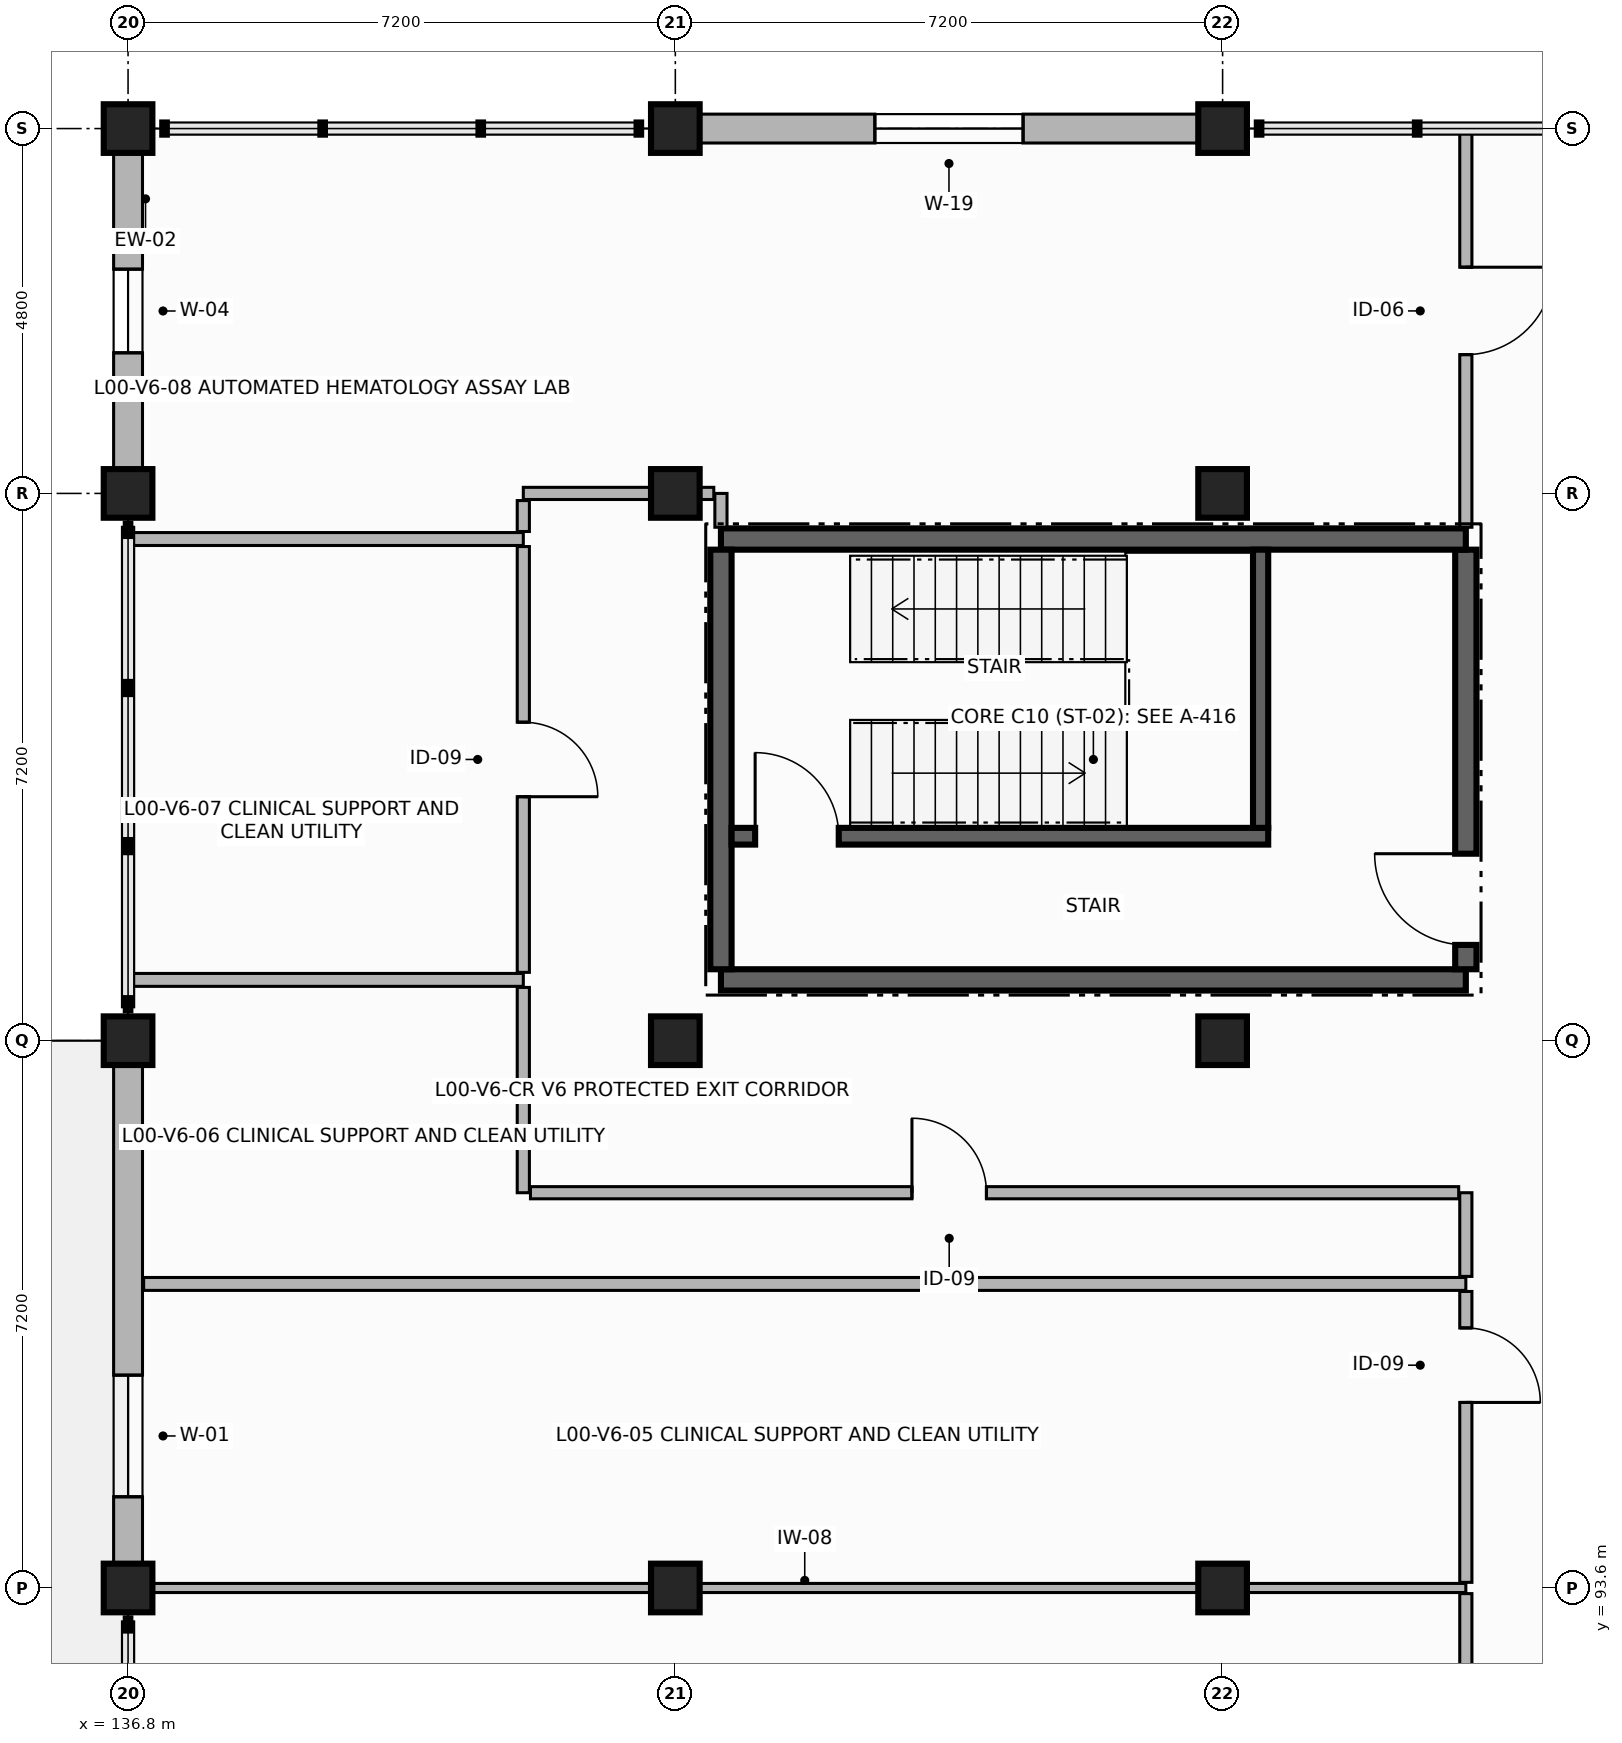
"""IFC4 building model, lengths in metres.
Left out: names, types, materials, properties, quantities, classifications, styles, units other than length and angle.
Written with IfcOpenShell. Run it as: python <this file> out.ifc"""

import sys

from ifc_helpers import new_model, si_unit, direction, frame, frame_2d, origin, origin_2d, place, context, subcontext, project, spatial, rectangle, extrude, element, fill, save


model = new_model("IFC4")
c1 = context("Model", 3, precision=1e-05, world=origin(), true_north=direction((0.0, 1.0)))
c2 = subcontext(c1, "Body", "Model", "MODEL_VIEW")
j1 = project(units=[si_unit("LENGTHUNIT", "METRE"), si_unit("PLANEANGLEUNIT", "RADIAN")], contexts=[c1])
p1 = place(None, origin())
s1 = spatial("IfcSite", under=j1, at=p1, CompositionType="ELEMENT")
p2 = place(p1, origin())
s2 = spatial("IfcBuilding", under=s1, at=p2, CompositionType="ELEMENT")
p3 = place(p2, origin())
s3 = spatial("IfcBuildingStorey", under=s2, at=p3, CompositionType="ELEMENT", Elevation=0.0)
for number, where, z_axis, x_axis in (
    (1, (136.8, 93.6, -0.38), (0.0, 0.0, 1.0), (1.0, 0.0, 0.0)),
    (2, (136.8, 100.8, -0.38), (0.0, 0.0, 1.0), (1.0, 0.0, 0.0)),
    (3, (136.8, 108.0, -0.38), (0.0, 0.0, 1.0), (1.0, 0.0, 0.0)),
    (4, (136.8, 112.8, -0.38), (0.0, 0.0, 1.0), (1.0, 0.0, 0.0)),
    (5, (144.0, 93.6, -0.38), (0.0, 0.0, 1.0), (1.0, 0.0, 0.0)),
    (6, (144.0, 100.8, -0.38), (0.0, 0.0, 1.0), (1.0, 0.0, 0.0)),
    (7, (144.0, 108.0, -0.38), (0.0, 0.0, 1.0), (1.0, 0.0, 0.0)),
    (8, (144.0, 112.8, -0.38), (0.0, 0.0, 1.0), (1.0, 0.0, 0.0)),
    (9, (151.2, 93.6, -0.38), (0.0, 0.0, 1.0), (1.0, 0.0, 0.0)),
    (10, (151.2, 100.8, -0.38), (0.0, 0.0, 1.0), (1.0, 0.0, 0.0)),
    (11, (151.2, 108.0, -0.38), (0.0, 0.0, 1.0), (1.0, 0.0, 0.0)),
    (12, (151.2, 112.8, -0.38), (0.0, 0.0, 1.0), (1.0, 0.0, 0.0)),
):
    element("IfcColumn", number, at=place(p3, frame(where, z_axis=z_axis, x_axis=x_axis)), inside=s3, PredefinedType="COLUMN", context=c2, shape_type="SweptSolid", body=[
        extrude(rectangle(XDim=0.64, YDim=0.64, at=origin_2d()), origin(), (0.0, 0.0, 1.0), 4.56),
    ])
p4 = place(p3, frame((151.2, 112.8, 0.0), z_axis=(0.0, 0.0, 1.0), x_axis=(-1.0, 0.0, 0.0)))
e13 = element("IfcWall", 13, at=p4, inside=s3, PredefinedType="SOLIDWALL", context=c2, shape_type="SweptSolid", body=[
    extrude(rectangle(XDim=7.2, YDim=0.38, at=frame_2d((3.6, 0.0))), origin(), (0.0, 0.0, 1.0), 3.51),
])
p5 = place(p4, frame((2.625, 0.0, 0.85)))
e14 = element("IfcOpeningElement", 14, at=p5, cuts=e13, PredefinedType="OPENING", context=c2, shape_type="SweptSolid", body=[
    extrude(rectangle(XDim=1.95, YDim=2.4, at=frame_2d((0.975, 1.2))), frame((0.0, 0.2, 0.0), z_axis=(0.0, -1.0, 0.0), x_axis=(1.0, 0.0, 0.0)), (0.0, 0.0, 1.0), 0.4),
])
p6 = place(p3, frame((136.8, 112.8, 0.0), z_axis=(0.0, 0.0, 1.0), x_axis=(0.0, -1.0, 0.0)))
e15 = element("IfcWall", 15, at=p6, inside=s3, PredefinedType="SOLIDWALL", context=c2, shape_type="SweptSolid", body=[
    extrude(rectangle(XDim=4.8, YDim=0.38, at=frame_2d((2.4, 0.0))), origin(), (0.0, 0.0, 1.0), 3.51),
])
p7 = place(p6, frame((1.85, 0.0, 0.85)))
e16 = element("IfcOpeningElement", 16, at=p7, cuts=e15, PredefinedType="OPENING", context=c2, shape_type="SweptSolid", body=[
    extrude(rectangle(XDim=1.1, YDim=2.35, at=frame_2d((0.55, 1.175))), frame((0.0, 0.2, 0.0), z_axis=(0.0, -1.0, 0.0), x_axis=(1.0, 0.0, 0.0)), (0.0, 0.0, 1.0), 0.4),
])
p8 = place(p3, frame((136.8, 100.8, 0.0), z_axis=(0.0, 0.0, 1.0), x_axis=(0.0, -1.0, 0.0)))
e17 = element("IfcWall", 17, at=p8, inside=s3, PredefinedType="SOLIDWALL", context=c2, shape_type="SweptSolid", body=[
    extrude(rectangle(XDim=7.2, YDim=0.38, at=frame_2d((3.6, 0.0))), origin(), (0.0, 0.0, 1.0), 3.51),
])
p9 = place(p8, frame((4.4, 0.0, 0.85)))
e18 = element("IfcOpeningElement", 18, at=p9, cuts=e17, PredefinedType="OPENING", context=c2, shape_type="SweptSolid", body=[
    extrude(rectangle(XDim=1.6, YDim=2.45, at=frame_2d((0.8, 1.225))), frame((0.0, 0.2, 0.0), z_axis=(0.0, -1.0, 0.0), x_axis=(1.0, 0.0, 0.0)), (0.0, 0.0, 1.0), 0.4),
])
p10 = place(p3, frame((144.6, 101.6, 0.0), z_axis=(0.0, 0.0, 1.0), x_axis=(1.0, 0.0, 0.0)))
e19 = element("IfcWall", 19, at=p10, inside=s3, PredefinedType="SHEAR", context=c2, shape_type="SweptSolid", body=[
    extrude(rectangle(XDim=9.8, YDim=0.28, at=frame_2d((4.9, 0.0))), origin(), (0.0, 0.0, 1.0), 4.18),
])
p11 = place(p3, frame((154.4, 101.74, 0.0), z_axis=(0.0, 0.0, 1.0), x_axis=(0.0, 1.0, 0.0)))
e20 = element("IfcWall", 20, at=p11, inside=s3, PredefinedType="SHEAR", context=c2, shape_type="SweptSolid", body=[
    extrude(rectangle(XDim=5.52, YDim=0.28, at=frame_2d((2.76, 0.0))), origin(), (0.0, 0.0, 1.0), 4.18),
])
p12 = place(p11, frame((0.32, 0.0, 0.0)))
e21 = element("IfcOpeningElement", 21, at=p12, cuts=e20, PredefinedType="OPENING", context=c2, shape_type="SweptSolid", body=[
    extrude(rectangle(XDim=1.2, YDim=2.25, at=frame_2d((0.6, 1.125))), frame((0.0, 0.15, 0.0), z_axis=(0.0, -1.0, 0.0), x_axis=(1.0, 0.0, 0.0)), (0.0, 0.0, 1.0), 0.3),
])
p13 = place(p3, frame((154.4, 107.4, 0.0), z_axis=(0.0, 0.0, 1.0), x_axis=(-1.0, 0.0, 0.0)))
e22 = element("IfcWall", 22, at=p13, inside=s3, PredefinedType="SHEAR", context=c2, shape_type="SweptSolid", body=[
    extrude(rectangle(XDim=9.8, YDim=0.28, at=frame_2d((4.9, 0.0))), origin(), (0.0, 0.0, 1.0), 4.18),
])
p14 = place(p3, frame((144.6, 107.26, 0.0), z_axis=(0.0, 0.0, 1.0), x_axis=(0.0, -1.0, 0.0)))
e23 = element("IfcWall", 23, at=p14, inside=s3, PredefinedType="SHEAR", context=c2, shape_type="SweptSolid", body=[
    extrude(rectangle(XDim=5.52, YDim=0.28, at=frame_2d((2.76, 0.0))), origin(), (0.0, 0.0, 1.0), 4.18),
])
p15 = place(p3, frame((144.74, 103.49, 0.0), z_axis=(0.0, 0.0, 1.0), x_axis=(1.0, 0.0, 0.0)))
e24 = element("IfcWall", 24, at=p15, inside=s3, PredefinedType="SHEAR", context=c2, shape_type="SweptSolid", body=[
    extrude(rectangle(XDim=7.06, YDim=0.22, at=frame_2d((3.53, 0.0))), origin(), (0.0, 0.0, 1.0), 4.18),
])
p16 = place(p15, frame((0.31, 0.0, 0.0)))
e25 = element("IfcOpeningElement", 25, at=p16, cuts=e24, PredefinedType="OPENING", context=c2, shape_type="SweptSolid", body=[
    extrude(rectangle(XDim=1.1, YDim=2.15, at=frame_2d((0.55, 1.075))), frame((0.0, 0.12, 0.0), z_axis=(0.0, -1.0, 0.0), x_axis=(1.0, 0.0, 0.0)), (0.0, 0.0, 1.0), 0.24),
])
p17 = place(p3, frame((151.7, 103.6, 0.0), z_axis=(0.0, 0.0, 1.0), x_axis=(0.0, 1.0, 0.0)))
e26 = element("IfcWall", 26, at=p17, inside=s3, PredefinedType="SHEAR", context=c2, shape_type="SweptSolid", body=[
    extrude(rectangle(XDim=3.66, YDim=0.2, at=frame_2d((1.83, 0.0))), origin(), (0.0, 0.0, 1.0), 4.18),
])
p18 = place(p3, frame((137.005, 93.6, 0.0), z_axis=(0.0, 0.0, 1.0), x_axis=(1.0, 0.0, 0.0)))
e27 = element("IfcWall", 27, at=p18, inside=s3, PredefinedType="PARTITIONING", context=c2, shape_type="SweptSolid", body=[
    extrude(rectangle(XDim=17.395, YDim=0.12, at=frame_2d((8.698, 0.0))), origin(), (0.0, 0.0, 1.0), 3.49),
])
p19 = place(p3, frame((154.4, 93.526, 0.0), z_axis=(0.0, 0.0, 1.0), x_axis=(0.0, -1.0, 0.0)))
e28 = element("IfcWall", 28, at=p19, inside=s3, PredefinedType="PARTITIONING", context=c2, shape_type="SweptSolid", body=[
    extrude(rectangle(XDim=7.126, YDim=0.16, at=frame_2d((3.563, 0.0))), origin(), (0.0, 0.0, 1.0), 3.49),
])
p20 = place(p19, frame((2.773, 0.0, 0.0)))
e29 = element("IfcOpeningElement", 29, at=p20, cuts=e28, PredefinedType="OPENING", context=c2, shape_type="SweptSolid", body=[
    extrude(rectangle(XDim=1.35, YDim=2.25, at=frame_2d((0.675, 1.125))), frame((0.0, 0.09, 0.0), z_axis=(0.0, -1.0, 0.0), x_axis=(1.0, 0.0, 0.0)), (0.0, 0.0, 1.0), 0.18),
])
p21 = place(p3, frame((137.005, 97.6, 0.0), z_axis=(0.0, 0.0, 1.0), x_axis=(1.0, 0.0, 0.0)))
e30 = element("IfcWall", 30, at=p21, inside=s3, PredefinedType="PARTITIONING", context=c2, shape_type="SweptSolid", body=[
    extrude(rectangle(XDim=17.395, YDim=0.17, at=frame_2d((8.698, 0.0))), origin(), (0.0, 0.0, 1.0), 3.49),
])
p22 = place(p3, frame((154.4, 97.501, 0.0), z_axis=(0.0, 0.0, 1.0), x_axis=(0.0, -1.0, 0.0)))
e31 = element("IfcWall", 31, at=p22, inside=s3, PredefinedType="PARTITIONING", context=c2, shape_type="SweptSolid", body=[
    extrude(rectangle(XDim=3.827, YDim=0.16, at=frame_2d((1.914, 0.0))), origin(), (0.0, 0.0, 1.0), 3.49),
])
p23 = place(p22, frame((0.48, 0.0, 0.0)))
e32 = element("IfcOpeningElement", 32, at=p23, cuts=e31, PredefinedType="OPENING", context=c2, shape_type="SweptSolid", body=[
    extrude(rectangle(XDim=0.98, YDim=2.15, at=frame_2d((0.49, 1.075))), frame((0.0, 0.09, 0.0), z_axis=(0.0, -1.0, 0.0), x_axis=(1.0, 0.0, 0.0)), (0.0, 0.0, 1.0), 0.18),
])
p24 = place(p3, frame((154.4, 98.8, 0.0), z_axis=(0.0, 0.0, 1.0), x_axis=(0.0, -1.0, 0.0)))
e33 = element("IfcWall", 33, at=p24, inside=s3, PredefinedType="PARTITIONING", context=c2, shape_type="SweptSolid", body=[
    extrude(rectangle(XDim=1.101, YDim=0.16, at=frame_2d((0.551, 0.0))), origin(), (0.0, 0.0, 1.0), 3.49),
])
p25 = place(p3, frame((136.8, 101.6, 0.0), z_axis=(0.0, 0.0, 1.0), x_axis=(1.0, 0.0, 0.0)))
e34 = element("IfcWall", 34, at=p25, inside=s3, PredefinedType="PARTITIONING", context=c2, shape_type="SweptSolid", body=[
    extrude(rectangle(XDim=5.2, YDim=0.17, at=frame_2d((2.6, 0.0))), origin(), (0.0, 0.0, 1.0), 3.49),
])
p26 = place(p3, frame((142.0, 101.501, 0.0), z_axis=(0.0, 0.0, 1.0), x_axis=(0.0, -1.0, 0.0)))
e35 = element("IfcWall", 35, at=p26, inside=s3, PredefinedType="PARTITIONING", context=c2, shape_type="SweptSolid", body=[
    extrude(rectangle(XDim=2.701, YDim=0.16, at=frame_2d((1.351, 0.0))), origin(), (0.0, 0.0, 1.0), 3.49),
])
p27 = place(p3, frame((142.094, 98.8, 0.0), z_axis=(0.0, 0.0, 1.0), x_axis=(1.0, 0.0, 0.0)))
e36 = element("IfcWall", 36, at=p27, inside=s3, PredefinedType="PARTITIONING", context=c2, shape_type="SweptSolid", body=[
    extrude(rectangle(XDim=12.212, YDim=0.16, at=frame_2d((6.106, 0.0))), origin(), (0.0, 0.0, 1.0), 3.49),
])
p28 = place(p27, frame((5.019, 0.0, 0.0)))
e37 = element("IfcOpeningElement", 37, at=p28, cuts=e36, PredefinedType="OPENING", context=c2, shape_type="SweptSolid", body=[
    extrude(rectangle(XDim=0.98, YDim=2.15, at=frame_2d((0.49, 1.075))), frame((0.0, 0.09, 0.0), z_axis=(0.0, -1.0, 0.0), x_axis=(1.0, 0.0, 0.0)), (0.0, 0.0, 1.0), 0.18),
])
p29 = place(p3, frame((136.8, 107.4, 0.0), z_axis=(0.0, 0.0, 1.0), x_axis=(1.0, 0.0, 0.0)))
e38 = element("IfcWall", 38, at=p29, inside=s3, PredefinedType="PARTITIONING", context=c2, shape_type="SweptSolid", body=[
    extrude(rectangle(XDim=5.2, YDim=0.17, at=frame_2d((2.6, 0.0))), origin(), (0.0, 0.0, 1.0), 3.49),
])
p30 = place(p3, frame((142.0, 107.301, 0.0), z_axis=(0.0, 0.0, 1.0), x_axis=(0.0, -1.0, 0.0)))
e39 = element("IfcWall", 39, at=p30, inside=s3, PredefinedType="PARTITIONING", context=c2, shape_type="SweptSolid", body=[
    extrude(rectangle(XDim=5.602, YDim=0.16, at=frame_2d((2.801, 0.0))), origin(), (0.0, 0.0, 1.0), 3.49),
])
p31 = place(p30, frame((2.311, 0.0, 0.0)))
e40 = element("IfcOpeningElement", 40, at=p31, cuts=e39, PredefinedType="OPENING", context=c2, shape_type="SweptSolid", body=[
    extrude(rectangle(XDim=0.98, YDim=2.15, at=frame_2d((0.49, 1.075))), frame((0.0, 0.09, 0.0), z_axis=(0.0, -1.0, 0.0), x_axis=(1.0, 0.0, 0.0)), (0.0, 0.0, 1.0), 0.18),
])
p32 = place(p3, frame((144.6, 107.555, 0.0), z_axis=(0.0, 0.0, 1.0), x_axis=(0.0, 1.0, 0.0)))
e41 = element("IfcWall", 41, at=p32, inside=s3, PredefinedType="PARTITIONING", context=c2, shape_type="SweptSolid", body=[
    extrude(rectangle(XDim=0.445, YDim=0.16, at=frame_2d((0.223, 0.0))), origin(), (0.0, 0.0, 1.0), 3.49),
])
p33 = place(p3, frame((144.506, 108.0, 0.0), z_axis=(0.0, 0.0, 1.0), x_axis=(-1.0, 0.0, 0.0)))
e42 = element("IfcWall", 42, at=p33, inside=s3, PredefinedType="PARTITIONING", context=c2, shape_type="SweptSolid", body=[
    extrude(rectangle(XDim=2.506, YDim=0.16, at=frame_2d((1.253, 0.0))), origin(), (0.0, 0.0, 1.0), 3.49),
])
p34 = place(p3, frame((142.0, 107.906, 0.0), z_axis=(0.0, 0.0, 1.0), x_axis=(0.0, -1.0, 0.0)))
e43 = element("IfcWall", 43, at=p34, inside=s3, PredefinedType="PARTITIONING", context=c2, shape_type="SweptSolid", body=[
    extrude(rectangle(XDim=0.407, YDim=0.16, at=frame_2d((0.204, 0.0))), origin(), (0.0, 0.0, 1.0), 3.49),
])
p35 = place(p3, frame((154.4, 112.8, 0.0), z_axis=(0.0, 0.0, 1.0), x_axis=(0.0, -1.0, 0.0)))
e44 = element("IfcWall", 44, at=p35, inside=s3, PredefinedType="PARTITIONING", context=c2, shape_type="SweptSolid", body=[
    extrude(rectangle(XDim=5.245, YDim=0.16, at=frame_2d((2.623, 0.0))), origin(), (0.0, 0.0, 1.0), 3.49),
])
p36 = place(p35, frame((1.824, 0.0, 0.0)))
e45 = element("IfcOpeningElement", 45, at=p36, cuts=e44, PredefinedType="OPENING", context=c2, shape_type="SweptSolid", body=[
    extrude(rectangle(XDim=1.15, YDim=2.25, at=frame_2d((0.575, 1.125))), frame((0.0, 0.09, 0.0), z_axis=(0.0, -1.0, 0.0), x_axis=(1.0, 0.0, 0.0)), (0.0, 0.0, 1.0), 0.18),
])
p37 = place(p5, origin())
e46 = element("IfcWindow", 46, at=p37, inside=s3, PartitioningType="SINGLE_PANEL", PredefinedType="WINDOW", context=c2, shape_type="SweptSolid", body=[
    extrude(rectangle(XDim=1.95, YDim=2.4, at=frame_2d((0.975, 1.2))), frame((0.0, 0.03, 0.0), z_axis=(0.0, -1.0, 0.0), x_axis=(1.0, 0.0, 0.0)), (0.0, 0.0, 1.0), 0.06),
])
fill(e14, e46)
p38 = place(p7, origin())
e47 = element("IfcWindow", 47, at=p38, inside=s3, PartitioningType="SINGLE_PANEL", PredefinedType="WINDOW", context=c2, shape_type="SweptSolid", body=[
    extrude(rectangle(XDim=1.1, YDim=2.35, at=frame_2d((0.55, 1.175))), frame((0.0, 0.03, 0.0), z_axis=(0.0, -1.0, 0.0), x_axis=(1.0, 0.0, 0.0)), (0.0, 0.0, 1.0), 0.06),
])
fill(e16, e47)
p39 = place(p9, origin())
e48 = element("IfcWindow", 48, at=p39, inside=s3, PartitioningType="SINGLE_PANEL", PredefinedType="WINDOW", context=c2, shape_type="SweptSolid", body=[
    extrude(rectangle(XDim=1.6, YDim=2.45, at=frame_2d((0.8, 1.225))), frame((0.0, 0.03, 0.0), z_axis=(0.0, -1.0, 0.0), x_axis=(1.0, 0.0, 0.0)), (0.0, 0.0, 1.0), 0.06),
])
fill(e18, e48)
p40 = place(p16, origin())
e49 = element("IfcDoor", 49, at=p40, inside=s3, OperationType="SINGLE_SWING_LEFT", PredefinedType="DOOR", context=c2, shape_type="SweptSolid", body=[
    extrude(rectangle(XDim=1.1, YDim=2.15, at=frame_2d((0.55, 1.075))), frame((0.0, 0.025, 0.0), z_axis=(0.0, -1.0, 0.0), x_axis=(1.0, 0.0, 0.0)), (0.0, 0.0, 1.0), 0.05),
])
fill(e25, e49)
p41 = place(p12, origin())
e50 = element("IfcDoor", 50, at=p41, inside=s3, OperationType="SINGLE_SWING_RIGHT", PredefinedType="DOOR", context=c2, shape_type="SweptSolid", body=[
    extrude(rectangle(XDim=1.2, YDim=2.25, at=frame_2d((0.6, 1.125))), frame((0.0, 0.025, 0.0), z_axis=(0.0, -1.0, 0.0), x_axis=(1.0, 0.0, 0.0)), (0.0, 0.0, 1.0), 0.05),
])
fill(e21, e50)
p42 = place(p23, origin())
e51 = element("IfcDoor", 51, at=p42, inside=s3, OperationType="SINGLE_SWING_RIGHT", PredefinedType="DOOR", context=c2, shape_type="SweptSolid", body=[
    extrude(rectangle(XDim=0.98, YDim=2.15, at=frame_2d((0.49, 1.075))), frame((0.0, 0.025, 0.0), z_axis=(0.0, -1.0, 0.0), x_axis=(1.0, 0.0, 0.0)), (0.0, 0.0, 1.0), 0.05),
])
fill(e32, e51)
p43 = place(p28, origin())
e52 = element("IfcDoor", 52, at=p43, inside=s3, OperationType="SINGLE_SWING_LEFT", PredefinedType="DOOR", context=c2, shape_type="SweptSolid", body=[
    extrude(rectangle(XDim=0.98, YDim=2.15, at=frame_2d((0.49, 1.075))), frame((0.0, 0.025, 0.0), z_axis=(0.0, -1.0, 0.0), x_axis=(1.0, 0.0, 0.0)), (0.0, 0.0, 1.0), 0.05),
])
fill(e37, e52)
p44 = place(p31, origin())
e53 = element("IfcDoor", 53, at=p44, inside=s3, OperationType="SINGLE_SWING_RIGHT", PredefinedType="DOOR", context=c2, shape_type="SweptSolid", body=[
    extrude(rectangle(XDim=0.98, YDim=2.15, at=frame_2d((0.49, 1.075))), frame((0.0, 0.025, 0.0), z_axis=(0.0, -1.0, 0.0), x_axis=(1.0, 0.0, 0.0)), (0.0, 0.0, 1.0), 0.05),
])
fill(e40, e53)
p45 = place(p36, origin())
e54 = element("IfcDoor", 54, at=p45, inside=s3, OperationType="SINGLE_SWING_LEFT", PredefinedType="DOOR", context=c2, shape_type="SweptSolid", body=[
    extrude(rectangle(XDim=1.15, YDim=2.25, at=frame_2d((0.575, 1.125))), frame((0.0, 0.025, 0.0), z_axis=(0.0, -1.0, 0.0), x_axis=(1.0, 0.0, 0.0)), (0.0, 0.0, 1.0), 0.05),
])
fill(e45, e54)
save(model, sys.argv[1])
